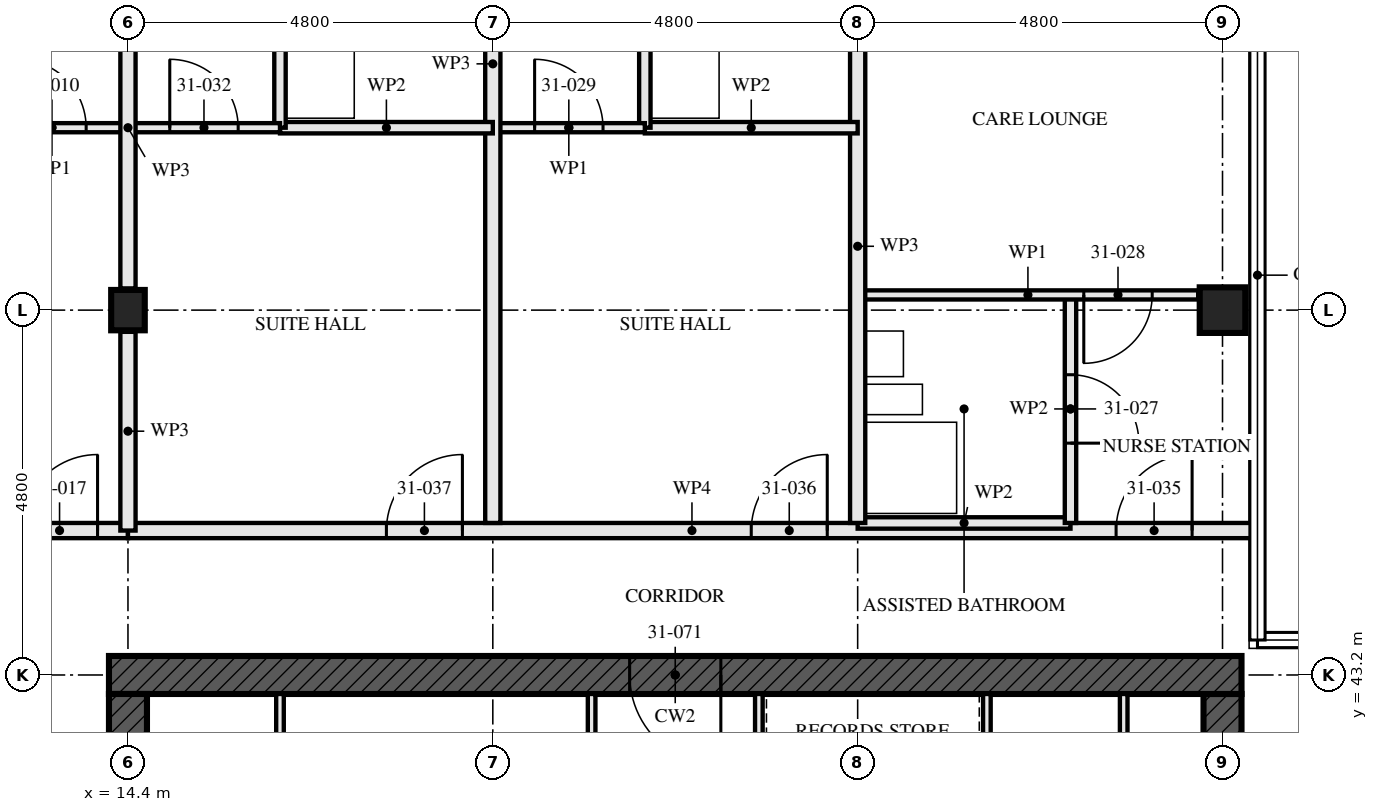
"""IFC4 building model, lengths in metres.
Left out: names, types, materials, properties, quantities, classifications, styles, units other than length and angle.
Written with IfcOpenShell. Run it as: python <this file> out.ifc"""

import sys

from ifc_helpers import new_model, si_unit, direction, frame, frame_2d, origin, origin_2d, place, context, subcontext, project, spatial, rectangle, hollow_rectangle, i_section, extrude, element, fill, save


model = new_model("IFC4")
c1 = context("Model", 3, precision=1e-05, world=origin(), true_north=direction((0.0, 1.0)))
c2 = subcontext(c1, "Body", "Model", "MODEL_VIEW")
j1 = project(units=[si_unit("LENGTHUNIT", "METRE"), si_unit("PLANEANGLEUNIT", "RADIAN")], contexts=[c1])
p1 = place(None, origin())
s1 = spatial("IfcSite", under=j1, at=p1, CompositionType="ELEMENT")
p2 = place(p1, origin())
s2 = spatial("IfcBuilding", under=s1, at=p2, CompositionType="ELEMENT")
p3 = place(p2, frame((0.0, 0.0, 115.5)))
s3 = spatial("IfcBuildingStorey", under=s2, at=p3, CompositionType="ELEMENT", Elevation=115.5)
p4 = place(p3, frame((14.4, 48.0, 0.0), z_axis=(0.0, 0.0, 1.0), x_axis=(1.0, 0.0, 0.0)))
e1 = element("IfcColumn", 1, at=p4, inside=s3, PredefinedType="COLUMN", context=c2, shape_type="SweptSolid", body=[
    extrude(i_section(OverallWidth=0.442, OverallDepth=0.531, WebThickness=0.066, FlangeThickness=0.106, FilletRadius=0.015, at=origin_2d()), origin(), (0.0, 0.0, 1.0), 3.5),
])
p5 = place(p3, frame((28.8, 48.0, 0.0), z_axis=(0.0, 0.0, 1.0), x_axis=(1.0, 0.0, 0.0)))
e2 = element("IfcColumn", 2, at=p5, inside=s3, PredefinedType="COLUMN", context=c2, shape_type="SweptSolid", body=[
    extrude(hollow_rectangle(XDim=0.6, YDim=0.6, WallThickness=0.08, at=origin_2d()), origin(), (0.0, 0.0, 1.0), 3.5),
])
p6 = place(p3, frame((29.05, 43.2, -0.17), z_axis=(0.0, 0.0, 1.0), x_axis=(-1.0, 0.0, 0.0)))
e3 = element("IfcWall", 3, at=p6, inside=s3, PredefinedType="SHEAR", context=c2, shape_type="SweptSolid", body=[
    extrude(rectangle(XDim=14.9, YDim=0.5, at=frame_2d((7.45, 0.0))), origin(), (0.0, 0.0, 1.0), 3.5),
])
p7 = place(p6, frame((6.85, 0.0, 0.17)))
e4 = element("IfcOpeningElement", 4, at=p7, cuts=e3, PredefinedType="OPENING", context=c2, shape_type="SweptSolid", body=[
    extrude(rectangle(XDim=1.2, YDim=2.1, at=frame_2d((0.6, 1.05))), frame((0.0, 0.26, 0.0), z_axis=(0.0, -1.0, 0.0), x_axis=(1.0, 0.0, 0.0)), (0.0, 0.0, 1.0), 0.521),
])
p8 = place(p3, frame((14.4, 42.95, -0.17), z_axis=(0.0, 0.0, 1.0), x_axis=(0.0, -1.0, 0.0)))
e5 = element("IfcWall", 5, at=p8, inside=s3, PredefinedType="SHEAR", context=c2, shape_type="SweptSolid", body=[
    extrude(rectangle(XDim=13.9, YDim=0.5, at=frame_2d((6.95, 0.0))), origin(), (0.0, 0.0, 1.0), 3.5),
])
p9 = place(p8, frame((6.35, 0.0, 0.17)))
e6 = element("IfcOpeningElement", 6, at=p9, cuts=e5, PredefinedType="OPENING", context=c2, shape_type="SweptSolid", body=[
    extrude(rectangle(XDim=1.2, YDim=2.1, at=frame_2d((0.6, 1.05))), frame((0.0, 0.26, 0.0), z_axis=(0.0, -1.0, 0.0), x_axis=(1.0, 0.0, 0.0)), (0.0, 0.0, 1.0), 0.521),
])
p10 = place(p3, frame((28.8, 29.05, -0.17), z_axis=(0.0, 0.0, 1.0), x_axis=(0.0, 1.0, 0.0)))
e7 = element("IfcWall", 7, at=p10, inside=s3, PredefinedType="SHEAR", context=c2, shape_type="SweptSolid", body=[
    extrude(rectangle(XDim=13.9, YDim=0.5, at=frame_2d((6.95, 0.0))), origin(), (0.0, 0.0, 1.0), 3.5),
])
p11 = place(p10, frame((6.35, 0.0, 0.17)))
e8 = element("IfcOpeningElement", 8, at=p11, cuts=e7, PredefinedType="OPENING", context=c2, shape_type="SweptSolid", body=[
    extrude(rectangle(XDim=1.2, YDim=2.1, at=frame_2d((0.6, 1.05))), frame((0.0, 0.26, 0.0), z_axis=(0.0, -1.0, 0.0), x_axis=(1.0, 0.0, 0.0)), (0.0, 0.0, 1.0), 0.521),
])
p12 = place(p3, frame((14.4, 50.4, 0.0), z_axis=(0.0, 0.0, 1.0), x_axis=(-1.0, 0.0, 0.0)))
e9 = element("IfcWall", 9, at=p12, inside=s3, PredefinedType="PARTITIONING", context=c2, shape_type="SweptSolid", body=[
    extrude(rectangle(XDim=2.0, YDim=0.12, at=frame_2d((1.0, 0.0))), origin(), (0.0, 0.0, 1.0), 3.33),
])
p13 = place(p12, frame((0.55, 0.0, 0.0)))
e10 = element("IfcOpeningElement", 10, at=p13, cuts=e9, PredefinedType="OPENING", context=c2, shape_type="SweptSolid", body=[
    extrude(rectangle(XDim=0.9, YDim=2.1, at=frame_2d((0.45, 1.05))), frame((0.0, 0.071, 0.0), z_axis=(0.0, -1.0, 0.0), x_axis=(1.0, 0.0, 0.0)), (0.0, 0.0, 1.0), 0.141),
])
p14 = place(p3, frame((14.4, 45.1, 0.0), z_axis=(0.0, 0.0, 1.0), x_axis=(-1.0, 0.0, 0.0)))
e11 = element("IfcWall", 11, at=p14, inside=s3, PredefinedType="PARTITIONING", context=c2, shape_type="SweptSolid", body=[
    extrude(rectangle(XDim=9.6, YDim=0.2, at=frame_2d((4.8, 0.0))), origin(), (0.0, 0.0, 1.0), 3.33),
])
p15 = place(p14, frame((0.4, 0.0, 0.0)))
e12 = element("IfcOpeningElement", 12, at=p15, cuts=e11, PredefinedType="OPENING", context=c2, shape_type="SweptSolid", body=[
    extrude(rectangle(XDim=1.0, YDim=2.1, at=frame_2d((0.5, 1.05))), frame((0.0, 0.111, 0.0), z_axis=(0.0, -1.0, 0.0), x_axis=(1.0, 0.0, 0.0)), (0.0, 0.0, 1.0), 0.221),
])
p16 = place(p14, frame((5.2, 0.0, 0.0)))
e13 = element("IfcOpeningElement", 13, at=p16, cuts=e11, PredefinedType="OPENING", context=c2, shape_type="SweptSolid", body=[
    extrude(rectangle(XDim=1.0, YDim=2.1, at=frame_2d((0.5, 1.05))), frame((0.0, 0.111, 0.0), z_axis=(0.0, -1.0, 0.0), x_axis=(1.0, 0.0, 0.0)), (0.0, 0.0, 1.0), 0.221),
])
p17 = place(p3, frame((26.8, 48.2, 0.0), z_axis=(0.0, 0.0, 1.0), x_axis=(0.0, -1.0, 0.0)))
e14 = element("IfcWall", 14, at=p17, inside=s3, PredefinedType="PARTITIONING", context=c2, shape_type="SweptSolid", body=[
    extrude(rectangle(XDim=3.0, YDim=0.15, at=frame_2d((1.5, 0.0))), origin(), (0.0, 0.0, 1.0), 2.55),
])
p18 = place(p17, frame((1.05, 0.0, 0.0)))
e15 = element("IfcOpeningElement", 15, at=p18, cuts=e14, PredefinedType="OPENING", context=c2, shape_type="SweptSolid", body=[
    extrude(rectangle(XDim=0.9, YDim=2.1, at=frame_2d((0.45, 1.05))), frame((0.0, 0.085, 0.0), z_axis=(0.0, -1.0, 0.0), x_axis=(1.0, 0.0, 0.0)), (0.0, 0.0, 1.0), 0.171),
])
p19 = place(p3, frame((26.8, 45.2, 0.0), z_axis=(0.0, 0.0, 1.0), x_axis=(-1.0, 0.0, 0.0)))
e16 = element("IfcWall", 16, at=p19, inside=s3, PredefinedType="PARTITIONING", context=c2, shape_type="SweptSolid", body=[
    extrude(rectangle(XDim=2.8, YDim=0.15, at=frame_2d((1.4, 0.0))), origin(), (0.0, 0.0, 1.0), 3.33),
])
p20 = place(p3, frame((28.48, 48.2, 0.0), z_axis=(0.0, 0.0, 1.0), x_axis=(-1.0, 0.0, 0.0)))
e17 = element("IfcWall", 17, at=p20, inside=s3, PredefinedType="PARTITIONING", context=c2, shape_type="SweptSolid", body=[
    extrude(rectangle(XDim=4.48, YDim=0.12, at=frame_2d((2.24, 0.0))), origin(), (0.0, 0.0, 1.0), 3.33),
])
p21 = place(p20, frame((0.605, 0.0, 0.0)))
e18 = element("IfcOpeningElement", 18, at=p21, cuts=e17, PredefinedType="OPENING", context=c2, shape_type="SweptSolid", body=[
    extrude(rectangle(XDim=0.9, YDim=2.1, at=frame_2d((0.45, 1.05))), frame((0.0, 0.071, 0.0), z_axis=(0.0, -1.0, 0.0), x_axis=(1.0, 0.0, 0.0)), (0.0, 0.0, 1.0), 0.141),
])
p22 = place(p3, frame((24.0, 52.48, 0.0), z_axis=(0.0, 0.0, 1.0), x_axis=(0.0, -1.0, 0.0)))
e19 = element("IfcWall", 19, at=p22, inside=s3, PredefinedType="PARTITIONING", context=c2, shape_type="SweptSolid", body=[
    extrude(rectangle(XDim=7.28, YDim=0.2, at=frame_2d((3.64, 0.0))), origin(), (0.0, 0.0, 1.0), 2.55),
])
p23 = place(p3, frame((21.2, 53.4, 0.0), z_axis=(0.0, 0.0, 1.0), x_axis=(0.0, -1.0, 0.0)))
e20 = element("IfcWall", 20, at=p23, inside=s3, PredefinedType="PARTITIONING", context=c2, shape_type="SweptSolid", body=[
    extrude(rectangle(XDim=3.0, YDim=0.15, at=frame_2d((1.5, 0.0))), origin(), (0.0, 0.0, 1.0), 2.55),
])
p24 = place(p3, frame((24.0, 50.4, 0.0), z_axis=(0.0, 0.0, 1.0), x_axis=(-1.0, 0.0, 0.0)))
e21 = element("IfcWall", 21, at=p24, inside=s3, PredefinedType="PARTITIONING", context=c2, shape_type="SweptSolid", body=[
    extrude(rectangle(XDim=2.8, YDim=0.15, at=frame_2d((1.4, 0.0))), origin(), (0.0, 0.0, 1.0), 3.33),
])
p25 = place(p3, frame((21.2, 50.4, 0.0), z_axis=(0.0, 0.0, 1.0), x_axis=(-1.0, 0.0, 0.0)))
e22 = element("IfcWall", 22, at=p25, inside=s3, PredefinedType="PARTITIONING", context=c2, shape_type="SweptSolid", body=[
    extrude(rectangle(XDim=2.0, YDim=0.12, at=frame_2d((1.0, 0.0))), origin(), (0.0, 0.0, 1.0), 3.33),
])
p26 = place(p25, frame((0.55, 0.0, 0.0)))
e23 = element("IfcOpeningElement", 23, at=p26, cuts=e22, PredefinedType="OPENING", context=c2, shape_type="SweptSolid", body=[
    extrude(rectangle(XDim=0.9, YDim=2.1, at=frame_2d((0.45, 1.05))), frame((0.0, 0.071, 0.0), z_axis=(0.0, -1.0, 0.0), x_axis=(1.0, 0.0, 0.0)), (0.0, 0.0, 1.0), 0.141),
])
p27 = place(p3, frame((19.2, 57.28, 0.0), z_axis=(0.0, 0.0, 1.0), x_axis=(0.0, -1.0, 0.0)))
e24 = element("IfcWall", 24, at=p27, inside=s3, PredefinedType="PARTITIONING", context=c2, shape_type="SweptSolid", body=[
    extrude(rectangle(XDim=12.08, YDim=0.2, at=frame_2d((6.04, 0.0))), origin(), (0.0, 0.0, 1.0), 2.55),
])
p28 = place(p3, frame((16.4, 53.4, 0.0), z_axis=(0.0, 0.0, 1.0), x_axis=(0.0, -1.0, 0.0)))
e25 = element("IfcWall", 25, at=p28, inside=s3, PredefinedType="PARTITIONING", context=c2, shape_type="SweptSolid", body=[
    extrude(rectangle(XDim=3.0, YDim=0.15, at=frame_2d((1.5, 0.0))), origin(), (0.0, 0.0, 1.0), 2.55),
])
p29 = place(p3, frame((19.2, 50.4, 0.0), z_axis=(0.0, 0.0, 1.0), x_axis=(-1.0, 0.0, 0.0)))
e26 = element("IfcWall", 26, at=p29, inside=s3, PredefinedType="PARTITIONING", context=c2, shape_type="SweptSolid", body=[
    extrude(rectangle(XDim=2.8, YDim=0.15, at=frame_2d((1.4, 0.0))), origin(), (0.0, 0.0, 1.0), 3.33),
])
p30 = place(p3, frame((16.4, 50.4, 0.0), z_axis=(0.0, 0.0, 1.0), x_axis=(-1.0, 0.0, 0.0)))
e27 = element("IfcWall", 27, at=p30, inside=s3, PredefinedType="PARTITIONING", context=c2, shape_type="SweptSolid", body=[
    extrude(rectangle(XDim=2.0, YDim=0.12, at=frame_2d((1.0, 0.0))), origin(), (0.0, 0.0, 1.0), 3.33),
])
p31 = place(p30, frame((0.55, 0.0, 0.0)))
e28 = element("IfcOpeningElement", 28, at=p31, cuts=e27, PredefinedType="OPENING", context=c2, shape_type="SweptSolid", body=[
    extrude(rectangle(XDim=0.9, YDim=2.1, at=frame_2d((0.45, 1.05))), frame((0.0, 0.071, 0.0), z_axis=(0.0, -1.0, 0.0), x_axis=(1.0, 0.0, 0.0)), (0.0, 0.0, 1.0), 0.141),
])
p32 = place(p3, frame((29.24, 45.1, 0.0), z_axis=(0.0, 0.0, 1.0), x_axis=(-1.0, 0.0, 0.0)))
e29 = element("IfcWall", 29, at=p32, inside=s3, PredefinedType="PARTITIONING", context=c2, shape_type="SweptSolid", body=[
    extrude(rectangle(XDim=14.84, YDim=0.2, at=frame_2d((7.42, 0.0))), origin(), (0.0, 0.0, 1.0), 2.32),
])
p33 = place(p32, frame((0.84, 0.0, 0.0)))
e30 = element("IfcOpeningElement", 30, at=p33, cuts=e29, PredefinedType="OPENING", context=c2, shape_type="SweptSolid", body=[
    extrude(rectangle(XDim=1.0, YDim=2.1, at=frame_2d((0.5, 1.05))), frame((0.0, 0.111, 0.0), z_axis=(0.0, -1.0, 0.0), x_axis=(1.0, 0.0, 0.0)), (0.0, 0.0, 1.0), 0.221),
])
p34 = place(p32, frame((5.64, 0.0, 0.0)))
e31 = element("IfcOpeningElement", 31, at=p34, cuts=e29, PredefinedType="OPENING", context=c2, shape_type="SweptSolid", body=[
    extrude(rectangle(XDim=1.0, YDim=2.1, at=frame_2d((0.5, 1.05))), frame((0.0, 0.111, 0.0), z_axis=(0.0, -1.0, 0.0), x_axis=(1.0, 0.0, 0.0)), (0.0, 0.0, 1.0), 0.221),
])
p35 = place(p32, frame((10.44, 0.0, 0.0)))
e32 = element("IfcOpeningElement", 32, at=p35, cuts=e29, PredefinedType="OPENING", context=c2, shape_type="SweptSolid", body=[
    extrude(rectangle(XDim=1.0, YDim=2.1, at=frame_2d((0.5, 1.05))), frame((0.0, 0.111, 0.0), z_axis=(0.0, -1.0, 0.0), x_axis=(1.0, 0.0, 0.0)), (0.0, 0.0, 1.0), 0.221),
])
for number, where, z_axis, x_axis in (
    (33, (16.4, 37.15, 0.0), (0.0, 0.0, 1.0), (0.0, 1.0, 0.0)),
    (34, (27.5, 37.15, 0.0), (0.0, 0.0, 1.0), (0.0, 1.0, 0.0)),
):
    element("IfcWall", number, at=place(p3, frame(where, z_axis=z_axis, x_axis=x_axis)), inside=s3, PredefinedType="SOLIDWALL", context=c2, shape_type="SweptSolid", body=[
        extrude(rectangle(XDim=5.8, YDim=0.1, at=frame_2d((2.9, 0.0))), origin(), (0.0, 0.0, 1.0), 3.33),
    ])
p36 = place(p3, frame((20.5, 37.15, 0.0), z_axis=(0.0, 0.0, 1.0), x_axis=(0.0, 1.0, 0.0)))
e35 = element("IfcWall", 35, at=p36, inside=s3, PredefinedType="SOLIDWALL", context=c2, shape_type="SweptSolid", body=[
    extrude(rectangle(XDim=5.8, YDim=0.1, at=frame_2d((2.9, 0.0))), origin(), (0.0, 0.0, 1.0), 3.33),
])
p37 = place(p36, frame((0.975, 0.0, 0.0)))
e36 = element("IfcOpeningElement", 36, at=p37, cuts=e35, PredefinedType="OPENING", context=c2, shape_type="SweptSolid", body=[
    extrude(rectangle(XDim=0.9, YDim=2.1, at=frame_2d((0.45, 1.05))), frame((0.0, 0.061, 0.0), z_axis=(0.0, -1.0, 0.0), x_axis=(1.0, 0.0, 0.0)), (0.0, 0.0, 1.0), 0.121),
])
p38 = place(p3, frame((22.7, 37.15, 0.0), z_axis=(0.0, 0.0, 1.0), x_axis=(0.0, 1.0, 0.0)))
e37 = element("IfcWall", 37, at=p38, inside=s3, PredefinedType="SOLIDWALL", context=c2, shape_type="SweptSolid", body=[
    extrude(rectangle(XDim=5.8, YDim=0.1, at=frame_2d((2.9, 0.0))), origin(), (0.0, 0.0, 1.0), 3.33),
])
p39 = place(p38, frame((0.925, 0.0, 0.0)))
e38 = element("IfcOpeningElement", 38, at=p39, cuts=e37, PredefinedType="OPENING", context=c2, shape_type="SweptSolid", body=[
    extrude(rectangle(XDim=1.0, YDim=2.1, at=frame_2d((0.5, 1.05))), frame((0.0, 0.061, 0.0), z_axis=(0.0, -1.0, 0.0), x_axis=(1.0, 0.0, 0.0)), (0.0, 0.0, 1.0), 0.121),
])
p40 = place(p38, frame((3.9, 0.0, 0.0)))
e39 = element("IfcOpeningElement", 39, at=p40, cuts=e37, PredefinedType="OPENING", context=c2, shape_type="SweptSolid", body=[
    extrude(rectangle(XDim=1.0, YDim=2.1, at=frame_2d((0.5, 1.05))), frame((0.0, 0.061, 0.0), z_axis=(0.0, -1.0, 0.0), x_axis=(1.0, 0.0, 0.0)), (0.0, 0.0, 1.0), 0.121),
])
p41 = place(p3, frame((25.7, 37.15, 0.0), z_axis=(0.0, 0.0, 1.0), x_axis=(0.0, 1.0, 0.0)))
e40 = element("IfcWall", 40, at=p41, inside=s3, PredefinedType="SOLIDWALL", context=c2, shape_type="SweptSolid", body=[
    extrude(rectangle(XDim=5.8, YDim=0.1, at=frame_2d((2.9, 0.0))), origin(), (0.0, 0.0, 1.0), 3.33),
])
p42 = place(p3, frame((14.4, 45.1, 0.0), z_axis=(0.0, 0.0, 1.0), x_axis=(0.0, 1.0, 0.0)))
e41 = element("IfcWall", 41, at=p42, inside=s3, PredefinedType="PARTITIONING", context=c2, shape_type="SweptSolid", body=[
    extrude(rectangle(XDim=2.615, YDim=0.2, at=frame_2d((1.307, 0.0))), origin(), (0.0, 0.0, 1.0), 2.32),
])
p43 = place(p3, frame((14.4, 48.285, 0.0), z_axis=(0.0, 0.0, 1.0), x_axis=(0.0, 1.0, 0.0)))
e42 = element("IfcWall", 42, at=p43, inside=s3, PredefinedType="PARTITIONING", context=c2, shape_type="SweptSolid", body=[
    extrude(rectangle(XDim=4.229, YDim=0.2, at=frame_2d((2.115, 0.0))), origin(), (0.0, 0.0, 1.0), 2.32),
])
p44 = place(p13, frame((0.9, 0.0, 0.0), z_axis=(0.0, 0.0, 1.0), x_axis=(-1.0, 0.0, 0.0)))
e43 = element("IfcDoor", 43, at=p44, inside=s3, OperationType="SINGLE_SWING_RIGHT", PredefinedType="DOOR", context=c2, shape_type="SweptSolid", body=[
    extrude(rectangle(XDim=0.9, YDim=2.1, at=frame_2d((0.45, 1.05))), frame((0.0, 0.022, 0.0), z_axis=(0.0, -1.0, 0.0), x_axis=(1.0, 0.0, 0.0)), (0.0, 0.0, 1.0), 0.044),
])
fill(e10, e43)
p45 = place(p15, frame((1.0, 0.0, 0.0), z_axis=(0.0, 0.0, 1.0), x_axis=(-1.0, 0.0, 0.0)))
e44 = element("IfcDoor", 44, at=p45, inside=s3, OperationType="SINGLE_SWING_LEFT", PredefinedType="DOOR", context=c2, shape_type="SweptSolid", body=[
    extrude(rectangle(XDim=1.0, YDim=2.1, at=frame_2d((0.5, 1.05))), frame((0.0, 0.027, 0.0), z_axis=(0.0, -1.0, 0.0), x_axis=(1.0, 0.0, 0.0)), (0.0, 0.0, 1.0), 0.054),
])
fill(e12, e44)
p46 = place(p18, origin())
e45 = element("IfcDoor", 45, at=p46, inside=s3, OperationType="SINGLE_SWING_LEFT", PredefinedType="DOOR", context=c2, shape_type="SweptSolid", body=[
    extrude(rectangle(XDim=0.9, YDim=2.1, at=frame_2d((0.45, 1.05))), frame((0.0, 0.022, 0.0), z_axis=(0.0, -1.0, 0.0), x_axis=(1.0, 0.0, 0.0)), (0.0, 0.0, 1.0), 0.044),
])
fill(e15, e45)
p47 = place(p21, origin())
e46 = element("IfcDoor", 46, at=p47, inside=s3, OperationType="SINGLE_SWING_LEFT", PredefinedType="DOOR", context=c2, shape_type="SweptSolid", body=[
    extrude(rectangle(XDim=0.9, YDim=2.1, at=frame_2d((0.45, 1.05))), frame((0.0, 0.022, 0.0), z_axis=(0.0, -1.0, 0.0), x_axis=(1.0, 0.0, 0.0)), (0.0, 0.0, 1.0), 0.044),
])
fill(e18, e46)
p48 = place(p26, frame((0.9, 0.0, 0.0), z_axis=(0.0, 0.0, 1.0), x_axis=(-1.0, 0.0, 0.0)))
e47 = element("IfcDoor", 47, at=p48, inside=s3, OperationType="SINGLE_SWING_RIGHT", PredefinedType="DOOR", context=c2, shape_type="SweptSolid", body=[
    extrude(rectangle(XDim=0.9, YDim=2.1, at=frame_2d((0.45, 1.05))), frame((0.0, 0.022, 0.0), z_axis=(0.0, -1.0, 0.0), x_axis=(1.0, 0.0, 0.0)), (0.0, 0.0, 1.0), 0.044),
])
fill(e23, e47)
p49 = place(p31, frame((0.9, 0.0, 0.0), z_axis=(0.0, 0.0, 1.0), x_axis=(-1.0, 0.0, 0.0)))
e48 = element("IfcDoor", 48, at=p49, inside=s3, OperationType="SINGLE_SWING_RIGHT", PredefinedType="DOOR", context=c2, shape_type="SweptSolid", body=[
    extrude(rectangle(XDim=0.9, YDim=2.1, at=frame_2d((0.45, 1.05))), frame((0.0, 0.022, 0.0), z_axis=(0.0, -1.0, 0.0), x_axis=(1.0, 0.0, 0.0)), (0.0, 0.0, 1.0), 0.044),
])
fill(e28, e48)
p50 = place(p33, frame((1.0, 0.0, 0.0), z_axis=(0.0, 0.0, 1.0), x_axis=(-1.0, 0.0, 0.0)))
e49 = element("IfcDoor", 49, at=p50, inside=s3, OperationType="SINGLE_SWING_LEFT", PredefinedType="DOOR", context=c2, shape_type="SweptSolid", body=[
    extrude(rectangle(XDim=1.0, YDim=2.1, at=frame_2d((0.5, 1.05))), frame((0.0, 0.027, 0.0), z_axis=(0.0, -1.0, 0.0), x_axis=(1.0, 0.0, 0.0)), (0.0, 0.0, 1.0), 0.054),
])
fill(e30, e49)
p51 = place(p34, frame((1.0, 0.0, 0.0), z_axis=(0.0, 0.0, 1.0), x_axis=(-1.0, 0.0, 0.0)))
e50 = element("IfcDoor", 50, at=p51, inside=s3, OperationType="SINGLE_SWING_LEFT", PredefinedType="DOOR", context=c2, shape_type="SweptSolid", body=[
    extrude(rectangle(XDim=1.0, YDim=2.1, at=frame_2d((0.5, 1.05))), frame((0.0, 0.027, 0.0), z_axis=(0.0, -1.0, 0.0), x_axis=(1.0, 0.0, 0.0)), (0.0, 0.0, 1.0), 0.054),
])
fill(e31, e50)
p52 = place(p35, frame((1.0, 0.0, 0.0), z_axis=(0.0, 0.0, 1.0), x_axis=(-1.0, 0.0, 0.0)))
e51 = element("IfcDoor", 51, at=p52, inside=s3, OperationType="SINGLE_SWING_LEFT", PredefinedType="DOOR", context=c2, shape_type="SweptSolid", body=[
    extrude(rectangle(XDim=1.0, YDim=2.1, at=frame_2d((0.5, 1.05))), frame((0.0, 0.027, 0.0), z_axis=(0.0, -1.0, 0.0), x_axis=(1.0, 0.0, 0.0)), (0.0, 0.0, 1.0), 0.054),
])
fill(e32, e51)
p53 = place(p7, origin())
e52 = element("IfcDoor", 52, at=p53, inside=s3, OperationType="SINGLE_SWING_LEFT", PredefinedType="DOOR", context=c2, shape_type="SweptSolid", body=[
    extrude(rectangle(XDim=1.2, YDim=2.1, at=frame_2d((0.6, 1.05))), frame((0.0, 0.027, 0.0), z_axis=(0.0, -1.0, 0.0), x_axis=(1.0, 0.0, 0.0)), (0.0, 0.0, 1.0), 0.054),
])
fill(e4, e52)
save(model, sys.argv[1])
